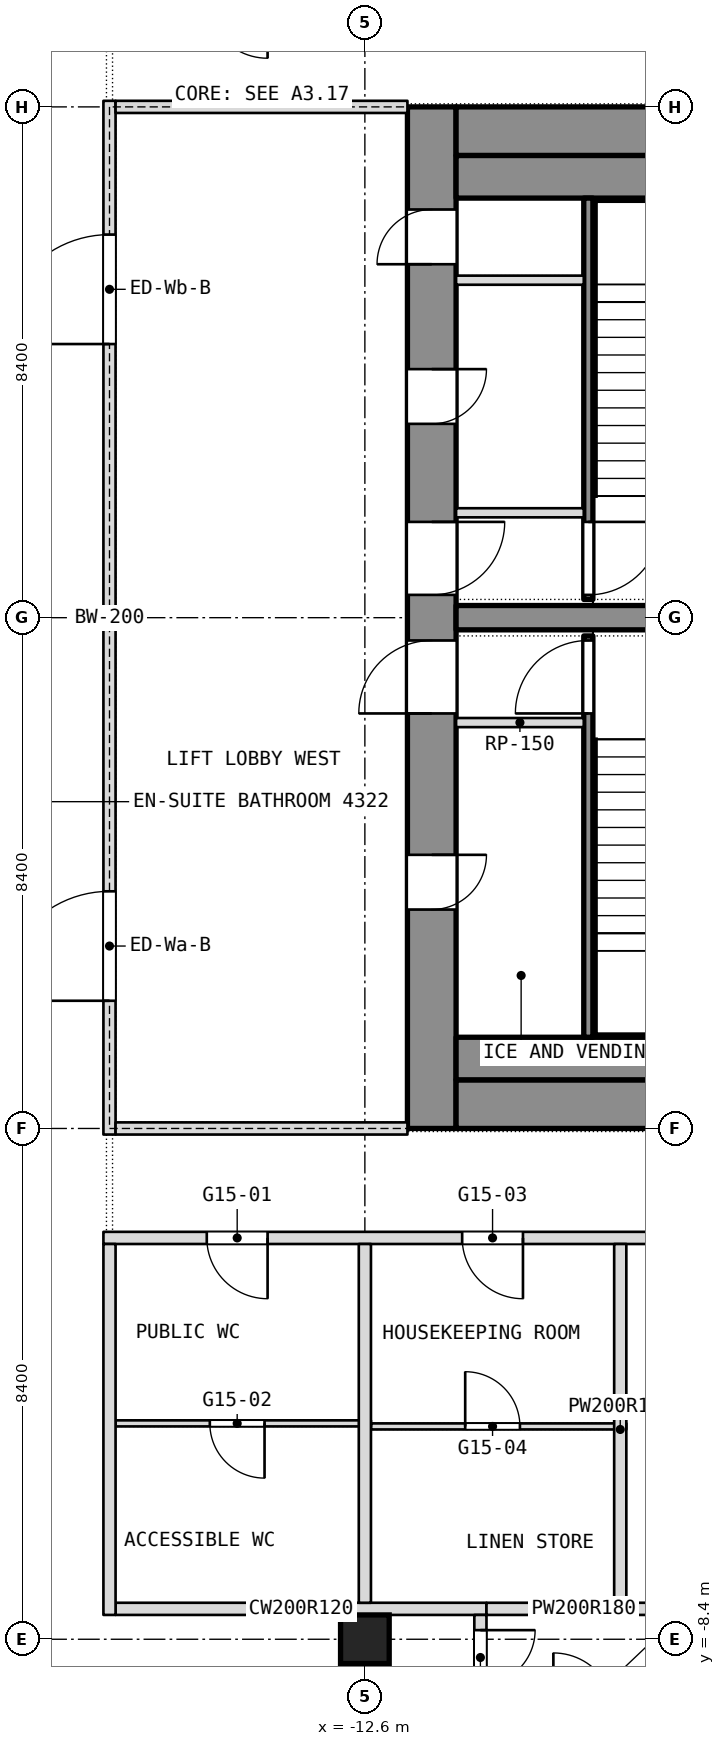
"""IFC4 building model, lengths in metres.
Left out: names, types, materials, properties, quantities, classifications, styles, units other than length and angle.
Written with IfcOpenShell. Run it as: python <this file> out.ifc"""

import sys

from ifc_helpers import new_model, si_unit, direction, frame, frame_2d, origin, origin_2d, place, context, subcontext, project, spatial, rectangle, extrude, element, fill, save


model = new_model("IFC4")
c1 = context("Model", 3, precision=1e-05, world=origin(), true_north=direction((0.0, 1.0)))
c2 = subcontext(c1, "Body", "Model", "MODEL_VIEW")
j1 = project(units=[si_unit("LENGTHUNIT", "METRE"), si_unit("PLANEANGLEUNIT", "RADIAN")], contexts=[c1])
p1 = place(None, origin())
s1 = spatial("IfcSite", under=j1, at=p1, CompositionType="ELEMENT")
p2 = place(p1, origin())
s2 = spatial("IfcBuilding", under=s1, at=p2, CompositionType="ELEMENT")
p3 = place(p2, frame((0.0, 0.0, 191.3)))
s3 = spatial("IfcBuildingStorey", under=s2, at=p3, CompositionType="ELEMENT", Elevation=191.3)
p4 = place(p3, frame((-11.5, 0.0, 0.0), z_axis=(0.0, 0.0, 1.0), x_axis=(0.0, 1.0, 0.0)))
e1 = element("IfcWall", 1, at=p4, inside=s3, PredefinedType="SHEAR", context=c2, shape_type="SweptSolid", body=[
    extrude(rectangle(XDim=16.8, YDim=0.8, at=frame_2d((8.4, 0.0))), origin(), (0.0, 0.0, 1.0), 3.6),
])
p5 = place(p4, frame((3.6, 0.0, 0.0)))
e2 = element("IfcOpeningElement", 2, at=p5, cuts=e1, PredefinedType="OPENING", context=c2, shape_type="SweptSolid", body=[
    extrude(rectangle(XDim=0.9, YDim=2.1, at=frame_2d((0.45, 1.05))), frame((0.0, 0.4, 0.0), z_axis=(0.0, -1.0, 0.0), x_axis=(1.0, 0.0, 0.0)), (0.0, 0.0, 1.0), 0.8),
])
p6 = place(p4, frame((6.825, 0.0, 0.0)))
e3 = element("IfcOpeningElement", 3, at=p6, cuts=e1, PredefinedType="OPENING", context=c2, shape_type="SweptSolid", body=[
    extrude(rectangle(XDim=1.2, YDim=2.1, at=frame_2d((0.6, 1.05))), frame((0.0, 0.4, 0.0), z_axis=(0.0, -1.0, 0.0), x_axis=(1.0, 0.0, 0.0)), (0.0, 0.0, 1.0), 0.8),
])
p7 = place(p4, frame((14.212, 0.0, 0.0)))
e4 = element("IfcOpeningElement", 4, at=p7, cuts=e1, PredefinedType="OPENING", context=c2, shape_type="SweptSolid", body=[
    extrude(rectangle(XDim=0.9, YDim=2.1, at=frame_2d((0.45, 1.05))), frame((0.0, 0.4, 0.0), z_axis=(0.0, -1.0, 0.0), x_axis=(1.0, 0.0, 0.0)), (0.0, 0.0, 1.0), 0.8),
])
p8 = place(p4, frame((11.587, 0.0, 0.0)))
e5 = element("IfcOpeningElement", 5, at=p8, cuts=e1, PredefinedType="OPENING", context=c2, shape_type="SweptSolid", body=[
    extrude(rectangle(XDim=0.9, YDim=2.1, at=frame_2d((0.45, 1.05))), frame((0.0, 0.4, 0.0), z_axis=(0.0, -1.0, 0.0), x_axis=(1.0, 0.0, 0.0)), (0.0, 0.0, 1.0), 0.8),
])
p9 = place(p4, frame((8.775, 0.0, 0.0)))
e6 = element("IfcOpeningElement", 6, at=p9, cuts=e1, PredefinedType="OPENING", context=c2, shape_type="SweptSolid", body=[
    extrude(rectangle(XDim=1.2, YDim=2.1, at=frame_2d((0.6, 1.05))), frame((0.0, 0.4, 0.0), z_axis=(0.0, -1.0, 0.0), x_axis=(1.0, 0.0, 0.0)), (0.0, 0.0, 1.0), 0.8),
])
for number, where, z_axis, x_axis in (
    (7, (-11.1, 0.4, 0.0), (0.0, 0.0, 1.0), (1.0, 0.0, 0.0)),
    (8, (-11.1, 16.4, 0.0), (0.0, 0.0, 1.0), (1.0, 0.0, 0.0)),
):
    element("IfcWall", number, at=place(p3, frame(where, z_axis=z_axis, x_axis=x_axis)), inside=s3, PredefinedType="SHEAR", context=c2, shape_type="SweptSolid", body=[
        extrude(rectangle(XDim=22.2, YDim=0.8, at=frame_2d((11.1, 0.0))), origin(), (0.0, 0.0, 1.0), 3.6),
    ])
p10 = place(p3, frame((-11.1, 8.4, 0.0), z_axis=(0.0, 0.0, 1.0), x_axis=(1.0, 0.0, 0.0)))
e9 = element("IfcWall", 9, at=p10, inside=s3, PredefinedType="SHEAR", context=c2, shape_type="SweptSolid", body=[
    extrude(rectangle(XDim=6.7, YDim=0.4, at=frame_2d((3.35, 0.0))), origin(), (0.0, 0.0, 1.0), 3.6),
])
p11 = place(p3, frame((-12.6, -8.4, 0.0), z_axis=(0.0, 0.0, 1.0), x_axis=(1.0, 0.0, 0.0)))
e10 = element("IfcColumn", 10, at=p11, inside=s3, PredefinedType="COLUMN", context=c2, shape_type="SweptSolid", body=[
    extrude(rectangle(XDim=0.8, YDim=0.8, at=origin_2d()), origin(), (0.0, 0.0, 1.0), 3.6),
])
p12 = place(p3, frame((-16.7, -7.9, 0.0), z_axis=(0.0, 0.0, 1.0), x_axis=(1.0, 0.0, 0.0)))
e11 = element("IfcWall", 11, at=p12, inside=s3, PredefinedType="PARTITIONING", context=c2, shape_type="SweptSolid", body=[
    extrude(rectangle(XDim=6.1, YDim=0.2, at=frame_2d((3.05, 0.0))), origin(), (0.0, 0.0, 1.0), 3.34),
])
p13 = place(p3, frame((-10.6, -7.9, 0.0), z_axis=(0.0, 0.0, 1.0), x_axis=(1.0, 0.0, 0.0)))
e12 = element("IfcWall", 12, at=p13, inside=s3, PredefinedType="PARTITIONING", context=c2, shape_type="SweptSolid", body=[
    extrude(rectangle(XDim=3.2, YDim=0.2, at=frame_2d((1.6, 0.0))), origin(), (0.0, 0.0, 1.0), 3.34),
])
p14 = place(p3, frame((-12.5, -4.9, 0.0), z_axis=(0.0, 0.0, 1.0), x_axis=(1.0, 0.0, 0.0)))
e13 = element("IfcWall", 13, at=p14, inside=s3, PredefinedType="PARTITIONING", context=c2, shape_type="SweptSolid", body=[
    extrude(rectangle(XDim=4.2, YDim=0.1, at=frame_2d((2.1, 0.0))), origin(), (0.0, 0.0, 1.0), 3.34),
])
p15 = place(p14, frame((1.55, 0.0, 0.0)))
e14 = element("IfcOpeningElement", 14, at=p15, cuts=e13, PredefinedType="OPENING", context=c2, shape_type="SweptSolid", body=[
    extrude(rectangle(XDim=0.9, YDim=2.1, at=frame_2d((0.45, 1.05))), frame((0.0, 0.05, 0.0), z_axis=(0.0, -1.0, 0.0), x_axis=(1.0, 0.0, 0.0)), (0.0, 0.0, 1.0), 0.1),
])
p16 = place(p3, frame((-16.7, -4.85, 0.0), z_axis=(0.0, 0.0, 1.0), x_axis=(1.0, 0.0, 0.0)))
e15 = element("IfcWall", 15, at=p16, inside=s3, PredefinedType="PARTITIONING", context=c2, shape_type="SweptSolid", body=[
    extrude(rectangle(XDim=4.2, YDim=0.1, at=frame_2d((2.1, 0.0))), origin(), (0.0, 0.0, 1.0), 3.34),
])
p17 = place(p16, frame((1.55, 0.0, 0.0)))
e16 = element("IfcOpeningElement", 16, at=p17, cuts=e15, PredefinedType="OPENING", context=c2, shape_type="SweptSolid", body=[
    extrude(rectangle(XDim=0.9, YDim=2.1, at=frame_2d((0.45, 1.05))), frame((0.0, 0.05, 0.0), z_axis=(0.0, -1.0, 0.0), x_axis=(1.0, 0.0, 0.0)), (0.0, 0.0, 1.0), 0.1),
])
p18 = place(p3, frame((-16.9, -1.8, 0.0), z_axis=(0.0, 0.0, 1.0), x_axis=(1.0, 0.0, 0.0)))
e17 = element("IfcWall", 17, at=p18, inside=s3, PredefinedType="PARTITIONING", context=c2, shape_type="SweptSolid", body=[
    extrude(rectangle(XDim=33.8, YDim=0.2, at=frame_2d((16.9, 0.0))), origin(), (0.0, 0.0, 1.0), 3.34),
])
p19 = place(p18, frame((1.7, 0.0, 0.0)))
e18 = element("IfcOpeningElement", 18, at=p19, cuts=e17, PredefinedType="OPENING", context=c2, shape_type="SweptSolid", body=[
    extrude(rectangle(XDim=1.0, YDim=2.1, at=frame_2d((0.5, 1.05))), frame((0.0, 0.1, 0.0), z_axis=(0.0, -1.0, 0.0), x_axis=(1.0, 0.0, 0.0)), (0.0, 0.0, 1.0), 0.2),
])
p20 = place(p18, frame((5.9, 0.0, 0.0)))
e19 = element("IfcOpeningElement", 19, at=p20, cuts=e17, PredefinedType="OPENING", context=c2, shape_type="SweptSolid", body=[
    extrude(rectangle(XDim=1.0, YDim=2.1, at=frame_2d((0.5, 1.05))), frame((0.0, 0.1, 0.0), z_axis=(0.0, -1.0, 0.0), x_axis=(1.0, 0.0, 0.0)), (0.0, 0.0, 1.0), 0.2),
])
p21 = place(p18, frame((10.1, 0.0, 0.0)))
e20 = element("IfcOpeningElement", 20, at=p21, cuts=e17, PredefinedType="OPENING", context=c2, shape_type="SweptSolid", body=[
    extrude(rectangle(XDim=1.0, YDim=2.1, at=frame_2d((0.5, 1.05))), frame((0.0, 0.1, 0.0), z_axis=(0.0, -1.0, 0.0), x_axis=(1.0, 0.0, 0.0)), (0.0, 0.0, 1.0), 0.2),
])
p22 = place(p18, frame((14.3, 0.0, 0.0)))
e21 = element("IfcOpeningElement", 21, at=p22, cuts=e17, PredefinedType="OPENING", context=c2, shape_type="SweptSolid", body=[
    extrude(rectangle(XDim=1.0, YDim=2.1, at=frame_2d((0.5, 1.05))), frame((0.0, 0.1, 0.0), z_axis=(0.0, -1.0, 0.0), x_axis=(1.0, 0.0, 0.0)), (0.0, 0.0, 1.0), 0.2),
])
p23 = place(p18, frame((18.5, 0.0, 0.0)))
e22 = element("IfcOpeningElement", 22, at=p23, cuts=e17, PredefinedType="OPENING", context=c2, shape_type="SweptSolid", body=[
    extrude(rectangle(XDim=1.0, YDim=2.1, at=frame_2d((0.5, 1.05))), frame((0.0, 0.1, 0.0), z_axis=(0.0, -1.0, 0.0), x_axis=(1.0, 0.0, 0.0)), (0.0, 0.0, 1.0), 0.2),
])
p24 = place(p18, frame((24.4, 0.0, 0.0)))
e23 = element("IfcOpeningElement", 23, at=p24, cuts=e17, PredefinedType="OPENING", context=c2, shape_type="SweptSolid", body=[
    extrude(rectangle(XDim=1.8, YDim=2.1, at=frame_2d((0.9, 1.05))), frame((0.0, 0.1, 0.0), z_axis=(0.0, -1.0, 0.0), x_axis=(1.0, 0.0, 0.0)), (0.0, 0.0, 1.0), 0.2),
])
p25 = place(p18, frame((31.1, 0.0, 0.0)))
e24 = element("IfcOpeningElement", 24, at=p25, cuts=e17, PredefinedType="OPENING", context=c2, shape_type="SweptSolid", body=[
    extrude(rectangle(XDim=1.0, YDim=2.1, at=frame_2d((0.5, 1.05))), frame((0.0, 0.1, 0.0), z_axis=(0.0, -1.0, 0.0), x_axis=(1.0, 0.0, 0.0)), (0.0, 0.0, 1.0), 0.2),
])
p26 = place(p3, frame((-8.4, -8.0, 0.0), z_axis=(0.0, 0.0, 1.0), x_axis=(0.0, 1.0, 0.0)))
e25 = element("IfcWall", 25, at=p26, inside=s3, PredefinedType="PARTITIONING", context=c2, shape_type="SweptSolid", body=[
    extrude(rectangle(XDim=6.1, YDim=0.2, at=frame_2d((3.05, 0.0))), origin(), (0.0, 0.0, 1.0), 3.34),
])
p27 = place(p3, frame((-10.7, -9.5, 0.0), z_axis=(0.0, 0.0, 1.0), x_axis=(0.0, 1.0, 0.0)))
e26 = element("IfcWall", 26, at=p27, inside=s3, PredefinedType="PARTITIONING", context=c2, shape_type="SweptSolid", body=[
    extrude(rectangle(XDim=1.5, YDim=0.2, at=frame_2d((0.75, 0.0))), origin(), (0.0, 0.0, 1.0), 3.34),
])
p28 = place(p27, frame((0.35, 0.0, 0.0)))
e27 = element("IfcOpeningElement", 27, at=p28, cuts=e26, PredefinedType="OPENING", context=c2, shape_type="SweptSolid", body=[
    extrude(rectangle(XDim=0.9, YDim=2.1, at=frame_2d((0.45, 1.05))), frame((0.0, 0.1, 0.0), z_axis=(0.0, -1.0, 0.0), x_axis=(1.0, 0.0, 0.0)), (0.0, 0.0, 1.0), 0.2),
])
p29 = place(p3, frame((-12.6, -7.8, 0.0), z_axis=(0.0, 0.0, 1.0), x_axis=(0.0, 1.0, 0.0)))
e28 = element("IfcWall", 28, at=p29, inside=s3, PredefinedType="PARTITIONING", context=c2, shape_type="SweptSolid", body=[
    extrude(rectangle(XDim=5.9, YDim=0.2, at=frame_2d((2.95, 0.0))), origin(), (0.0, 0.0, 1.0), 3.34),
])
p30 = place(p3, frame((-16.8, -8.0, 0.0), z_axis=(0.0, 0.0, 1.0), x_axis=(0.0, 1.0, 0.0)))
e29 = element("IfcWall", 29, at=p30, inside=s3, PredefinedType="PARTITIONING", context=c2, shape_type="SweptSolid", body=[
    extrude(rectangle(XDim=6.1, YDim=0.2, at=frame_2d((3.05, 0.0))), origin(), (0.0, 0.0, 1.0), 3.34),
])
for number, where, z_axis, x_axis in (
    (30, (-11.1, 1.15, 0.0), (0.0, 0.0, 1.0), (1.0, 0.0, 0.0)),
    (31, (-11.1, 15.65, 0.0), (0.0, 0.0, 1.0), (1.0, 0.0, 0.0)),
):
    element("IfcWall", number, at=place(p3, frame(where, z_axis=z_axis, x_axis=x_axis)), inside=s3, PredefinedType="PARTITIONING", context=c2, shape_type="SweptSolid", body=[
        extrude(rectangle(XDim=22.2, YDim=0.7, at=frame_2d((11.1, 0.0))), origin(), (0.0, 0.0, 1.0), 3.34),
    ])
p31 = place(p3, frame((-8.925, 1.5, 0.0), z_axis=(0.0, 0.0, 1.0), x_axis=(0.0, 1.0, 0.0)))
e32 = element("IfcWall", 32, at=p31, inside=s3, PredefinedType="SHEAR", context=c2, shape_type="SweptSolid", body=[
    extrude(rectangle(XDim=6.6, YDim=0.15, at=frame_2d((3.3, 0.0))), origin(), (0.0, 0.0, 1.0), 3.34),
])
p32 = place(p31, frame((5.325, 0.0, 0.0)))
e33 = element("IfcOpeningElement", 33, at=p32, cuts=e32, PredefinedType="OPENING", context=c2, shape_type="SweptSolid", body=[
    extrude(rectangle(XDim=1.2, YDim=2.1, at=frame_2d((0.6, 1.05))), frame((0.0, 0.075, 0.0), z_axis=(0.0, -1.0, 0.0), x_axis=(1.0, 0.0, 0.0)), (0.0, 0.0, 1.0), 0.15),
])
p33 = place(p3, frame((-11.1, 6.675, 0.0), z_axis=(0.0, 0.0, 1.0), x_axis=(1.0, 0.0, 0.0)))
e34 = element("IfcWall", 34, at=p33, inside=s3, PredefinedType="PARTITIONING", context=c2, shape_type="SweptSolid", body=[
    extrude(rectangle(XDim=2.1, YDim=0.15, at=frame_2d((1.05, 0.0))), origin(), (0.0, 0.0, 1.0), 3.34),
])
p34 = place(p3, frame((-8.925, 8.7, 0.0), z_axis=(0.0, 0.0, 1.0), x_axis=(0.0, 1.0, 0.0)))
e35 = element("IfcWall", 35, at=p34, inside=s3, PredefinedType="SHEAR", context=c2, shape_type="SweptSolid", body=[
    extrude(rectangle(XDim=6.6, YDim=0.15, at=frame_2d((3.3, 0.0))), origin(), (0.0, 0.0, 1.0), 3.34),
])
p35 = place(p34, frame((0.075, 0.0, 0.0)))
e36 = element("IfcOpeningElement", 36, at=p35, cuts=e35, PredefinedType="OPENING", context=c2, shape_type="SweptSolid", body=[
    extrude(rectangle(XDim=1.2, YDim=2.1, at=frame_2d((0.6, 1.05))), frame((0.0, 0.075, 0.0), z_axis=(0.0, -1.0, 0.0), x_axis=(1.0, 0.0, 0.0)), (0.0, 0.0, 1.0), 0.15),
])
for number, where, z_axis, x_axis in (
    (37, (-11.1, 10.125, 0.0), (0.0, 0.0, 1.0), (1.0, 0.0, 0.0)),
    (38, (-11.1, 13.95, 0.0), (0.0, 0.0, 1.0), (1.0, 0.0, 0.0)),
):
    element("IfcWall", number, at=place(p3, frame(where, z_axis=z_axis, x_axis=x_axis)), inside=s3, PredefinedType="PARTITIONING", context=c2, shape_type="SweptSolid", body=[
        extrude(rectangle(XDim=2.1, YDim=0.15, at=frame_2d((1.05, 0.0))), origin(), (0.0, 0.0, 1.0), 3.34),
    ])
p36 = place(p3, frame((-16.8, -0.1, 0.0), z_axis=(0.0, 0.0, 1.0), x_axis=(0.0, 1.0, 0.0)))
e39 = element("IfcWall", 39, at=p36, inside=s3, PredefinedType="PARTITIONING", context=c2, shape_type="SweptSolid", body=[
    extrude(rectangle(XDim=17.0, YDim=0.2, at=frame_2d((8.5, 0.0))), origin(), (0.0, 0.0, 1.0), 3.34),
])
p37 = place(p36, frame((2.2, 0.0, 0.0)))
e40 = element("IfcOpeningElement", 40, at=p37, cuts=e39, PredefinedType="OPENING", context=c2, shape_type="SweptSolid", body=[
    extrude(rectangle(XDim=1.8, YDim=2.1, at=frame_2d((0.9, 1.05))), frame((0.0, 0.1, 0.0), z_axis=(0.0, -1.0, 0.0), x_axis=(1.0, 0.0, 0.0)), (0.0, 0.0, 1.0), 0.2),
])
p38 = place(p36, frame((13.0, 0.0, 0.0)))
e41 = element("IfcOpeningElement", 41, at=p38, cuts=e39, PredefinedType="OPENING", context=c2, shape_type="SweptSolid", body=[
    extrude(rectangle(XDim=1.8, YDim=2.1, at=frame_2d((0.9, 1.05))), frame((0.0, 0.1, 0.0), z_axis=(0.0, -1.0, 0.0), x_axis=(1.0, 0.0, 0.0)), (0.0, 0.0, 1.0), 0.2),
])
for number, where, z_axis, x_axis in (
    (42, (-16.7, 0.0, 0.0), (0.0, 0.0, 1.0), (1.0, 0.0, 0.0)),
    (43, (-16.7, 16.8, 0.0), (0.0, 0.0, 1.0), (1.0, 0.0, 0.0)),
):
    element("IfcWall", number, at=place(p3, frame(where, z_axis=z_axis, x_axis=x_axis)), inside=s3, PredefinedType="PARTITIONING", context=c2, shape_type="SweptSolid", body=[
        extrude(rectangle(XDim=4.8, YDim=0.2, at=frame_2d((2.4, 0.0))), origin(), (0.0, 0.0, 1.0), 2.94),
    ])
p39 = place(p15, origin())
e44 = element("IfcDoor", 44, at=p39, inside=s3, OperationType="SINGLE_SWING_RIGHT", PredefinedType="DOOR", context=c2, shape_type="SweptSolid", body=[
    extrude(rectangle(XDim=0.9, YDim=2.1, at=frame_2d((0.45, 1.05))), frame((0.0, 0.025, 0.0), z_axis=(0.0, -1.0, 0.0), x_axis=(1.0, 0.0, 0.0)), (0.0, 0.0, 1.0), 0.05),
])
fill(e14, e44)
p40 = place(p17, origin())
e45 = element("IfcDoor", 45, at=p40, inside=s3, OperationType="SINGLE_SWING_RIGHT", PredefinedType="DOOR", context=c2, shape_type="SweptSolid", body=[
    extrude(rectangle(XDim=0.9, YDim=2.1, at=frame_2d((0.45, 1.05))), frame((0.0, 0.025, 0.0), z_axis=(0.0, -1.0, 0.0), x_axis=(1.0, 0.0, 0.0)), (0.0, 0.0, 1.0), 0.05),
])
fill(e16, e45)
p41 = place(p19, origin())
e46 = element("IfcDoor", 46, at=p41, inside=s3, OperationType="SINGLE_SWING_LEFT", PredefinedType="DOOR", context=c2, shape_type="SweptSolid", body=[
    extrude(rectangle(XDim=1.0, YDim=2.1, at=frame_2d((0.5, 1.05))), frame((0.0, 0.025, 0.0), z_axis=(0.0, -1.0, 0.0), x_axis=(1.0, 0.0, 0.0)), (0.0, 0.0, 1.0), 0.05),
])
fill(e18, e46)
p42 = place(p20, origin())
e47 = element("IfcDoor", 47, at=p42, inside=s3, OperationType="SINGLE_SWING_LEFT", PredefinedType="DOOR", context=c2, shape_type="SweptSolid", body=[
    extrude(rectangle(XDim=1.0, YDim=2.1, at=frame_2d((0.5, 1.05))), frame((0.0, 0.025, 0.0), z_axis=(0.0, -1.0, 0.0), x_axis=(1.0, 0.0, 0.0)), (0.0, 0.0, 1.0), 0.05),
])
fill(e19, e47)
p43 = place(p28, origin())
e48 = element("IfcDoor", 48, at=p43, inside=s3, OperationType="SINGLE_SWING_LEFT", PredefinedType="DOOR", context=c2, shape_type="SweptSolid", body=[
    extrude(rectangle(XDim=0.9, YDim=2.1, at=frame_2d((0.45, 1.05))), frame((0.0, 0.025, 0.0), z_axis=(0.0, -1.0, 0.0), x_axis=(1.0, 0.0, 0.0)), (0.0, 0.0, 1.0), 0.05),
])
fill(e27, e48)
p44 = place(p5, origin())
e49 = element("IfcDoor", 49, at=p44, inside=s3, OperationType="SINGLE_SWING_LEFT", PredefinedType="DOOR", context=c2, shape_type="SweptSolid", body=[
    extrude(rectangle(XDim=0.9, YDim=2.1, at=frame_2d((0.45, 1.05))), frame((0.0, 0.025, 0.0), z_axis=(0.0, -1.0, 0.0), x_axis=(1.0, 0.0, 0.0)), (0.0, 0.0, 1.0), 0.05),
])
fill(e2, e49)
p45 = place(p6, origin())
e50 = element("IfcDoor", 50, at=p45, inside=s3, OperationType="SINGLE_SWING_LEFT", PredefinedType="DOOR", context=c2, shape_type="SweptSolid", body=[
    extrude(rectangle(XDim=1.2, YDim=2.1, at=frame_2d((0.6, 1.05))), frame((0.0, 0.025, 0.0), z_axis=(0.0, -1.0, 0.0), x_axis=(1.0, 0.0, 0.0)), (0.0, 0.0, 1.0), 0.05),
])
fill(e3, e50)
p46 = place(p32, origin())
e51 = element("IfcDoor", 51, at=p46, inside=s3, OperationType="SINGLE_SWING_LEFT", PredefinedType="DOOR", context=c2, shape_type="SweptSolid", body=[
    extrude(rectangle(XDim=1.2, YDim=2.1, at=frame_2d((0.6, 1.05))), frame((0.0, 0.025, 0.0), z_axis=(0.0, -1.0, 0.0), x_axis=(1.0, 0.0, 0.0)), (0.0, 0.0, 1.0), 0.05),
])
fill(e33, e51)
p47 = place(p7, origin())
e52 = element("IfcDoor", 52, at=p47, inside=s3, OperationType="SINGLE_SWING_LEFT", PredefinedType="DOOR", context=c2, shape_type="SweptSolid", body=[
    extrude(rectangle(XDim=0.9, YDim=2.1, at=frame_2d((0.45, 1.05))), frame((0.0, 0.025, 0.0), z_axis=(0.0, -1.0, 0.0), x_axis=(1.0, 0.0, 0.0)), (0.0, 0.0, 1.0), 0.05),
])
fill(e4, e52)
p48 = place(p8, origin())
e53 = element("IfcDoor", 53, at=p48, inside=s3, OperationType="SINGLE_SWING_LEFT", PredefinedType="DOOR", context=c2, shape_type="SweptSolid", body=[
    extrude(rectangle(XDim=0.9, YDim=2.1, at=frame_2d((0.45, 1.05))), frame((0.0, 0.025, 0.0), z_axis=(0.0, -1.0, 0.0), x_axis=(1.0, 0.0, 0.0)), (0.0, 0.0, 1.0), 0.05),
])
fill(e5, e53)
p49 = place(p9, origin())
e54 = element("IfcDoor", 54, at=p49, inside=s3, OperationType="SINGLE_SWING_LEFT", PredefinedType="DOOR", context=c2, shape_type="SweptSolid", body=[
    extrude(rectangle(XDim=1.2, YDim=2.1, at=frame_2d((0.6, 1.05))), frame((0.0, 0.025, 0.0), z_axis=(0.0, -1.0, 0.0), x_axis=(1.0, 0.0, 0.0)), (0.0, 0.0, 1.0), 0.05),
])
fill(e6, e54)
p50 = place(p35, origin())
e55 = element("IfcDoor", 55, at=p50, inside=s3, OperationType="SINGLE_SWING_LEFT", PredefinedType="DOOR", context=c2, shape_type="SweptSolid", body=[
    extrude(rectangle(XDim=1.2, YDim=2.1, at=frame_2d((0.6, 1.05))), frame((0.0, 0.025, 0.0), z_axis=(0.0, -1.0, 0.0), x_axis=(1.0, 0.0, 0.0)), (0.0, 0.0, 1.0), 0.05),
])
fill(e36, e55)
p51 = place(p37, origin())
e56 = element("IfcDoor", 56, at=p51, inside=s3, OperationType="DOUBLE_DOOR_SINGLE_SWING", PredefinedType="DOOR", context=c2, shape_type="SweptSolid", body=[
    extrude(rectangle(XDim=1.8, YDim=2.1, at=frame_2d((0.9, 1.05))), frame((0.0, 0.025, 0.0), z_axis=(0.0, -1.0, 0.0), x_axis=(1.0, 0.0, 0.0)), (0.0, 0.0, 1.0), 0.05),
])
fill(e40, e56)
p52 = place(p38, origin())
e57 = element("IfcDoor", 57, at=p52, inside=s3, OperationType="DOUBLE_DOOR_SINGLE_SWING", PredefinedType="DOOR", context=c2, shape_type="SweptSolid", body=[
    extrude(rectangle(XDim=1.8, YDim=2.1, at=frame_2d((0.9, 1.05))), frame((0.0, 0.025, 0.0), z_axis=(0.0, -1.0, 0.0), x_axis=(1.0, 0.0, 0.0)), (0.0, 0.0, 1.0), 0.05),
])
fill(e41, e57)
save(model, sys.argv[1])
